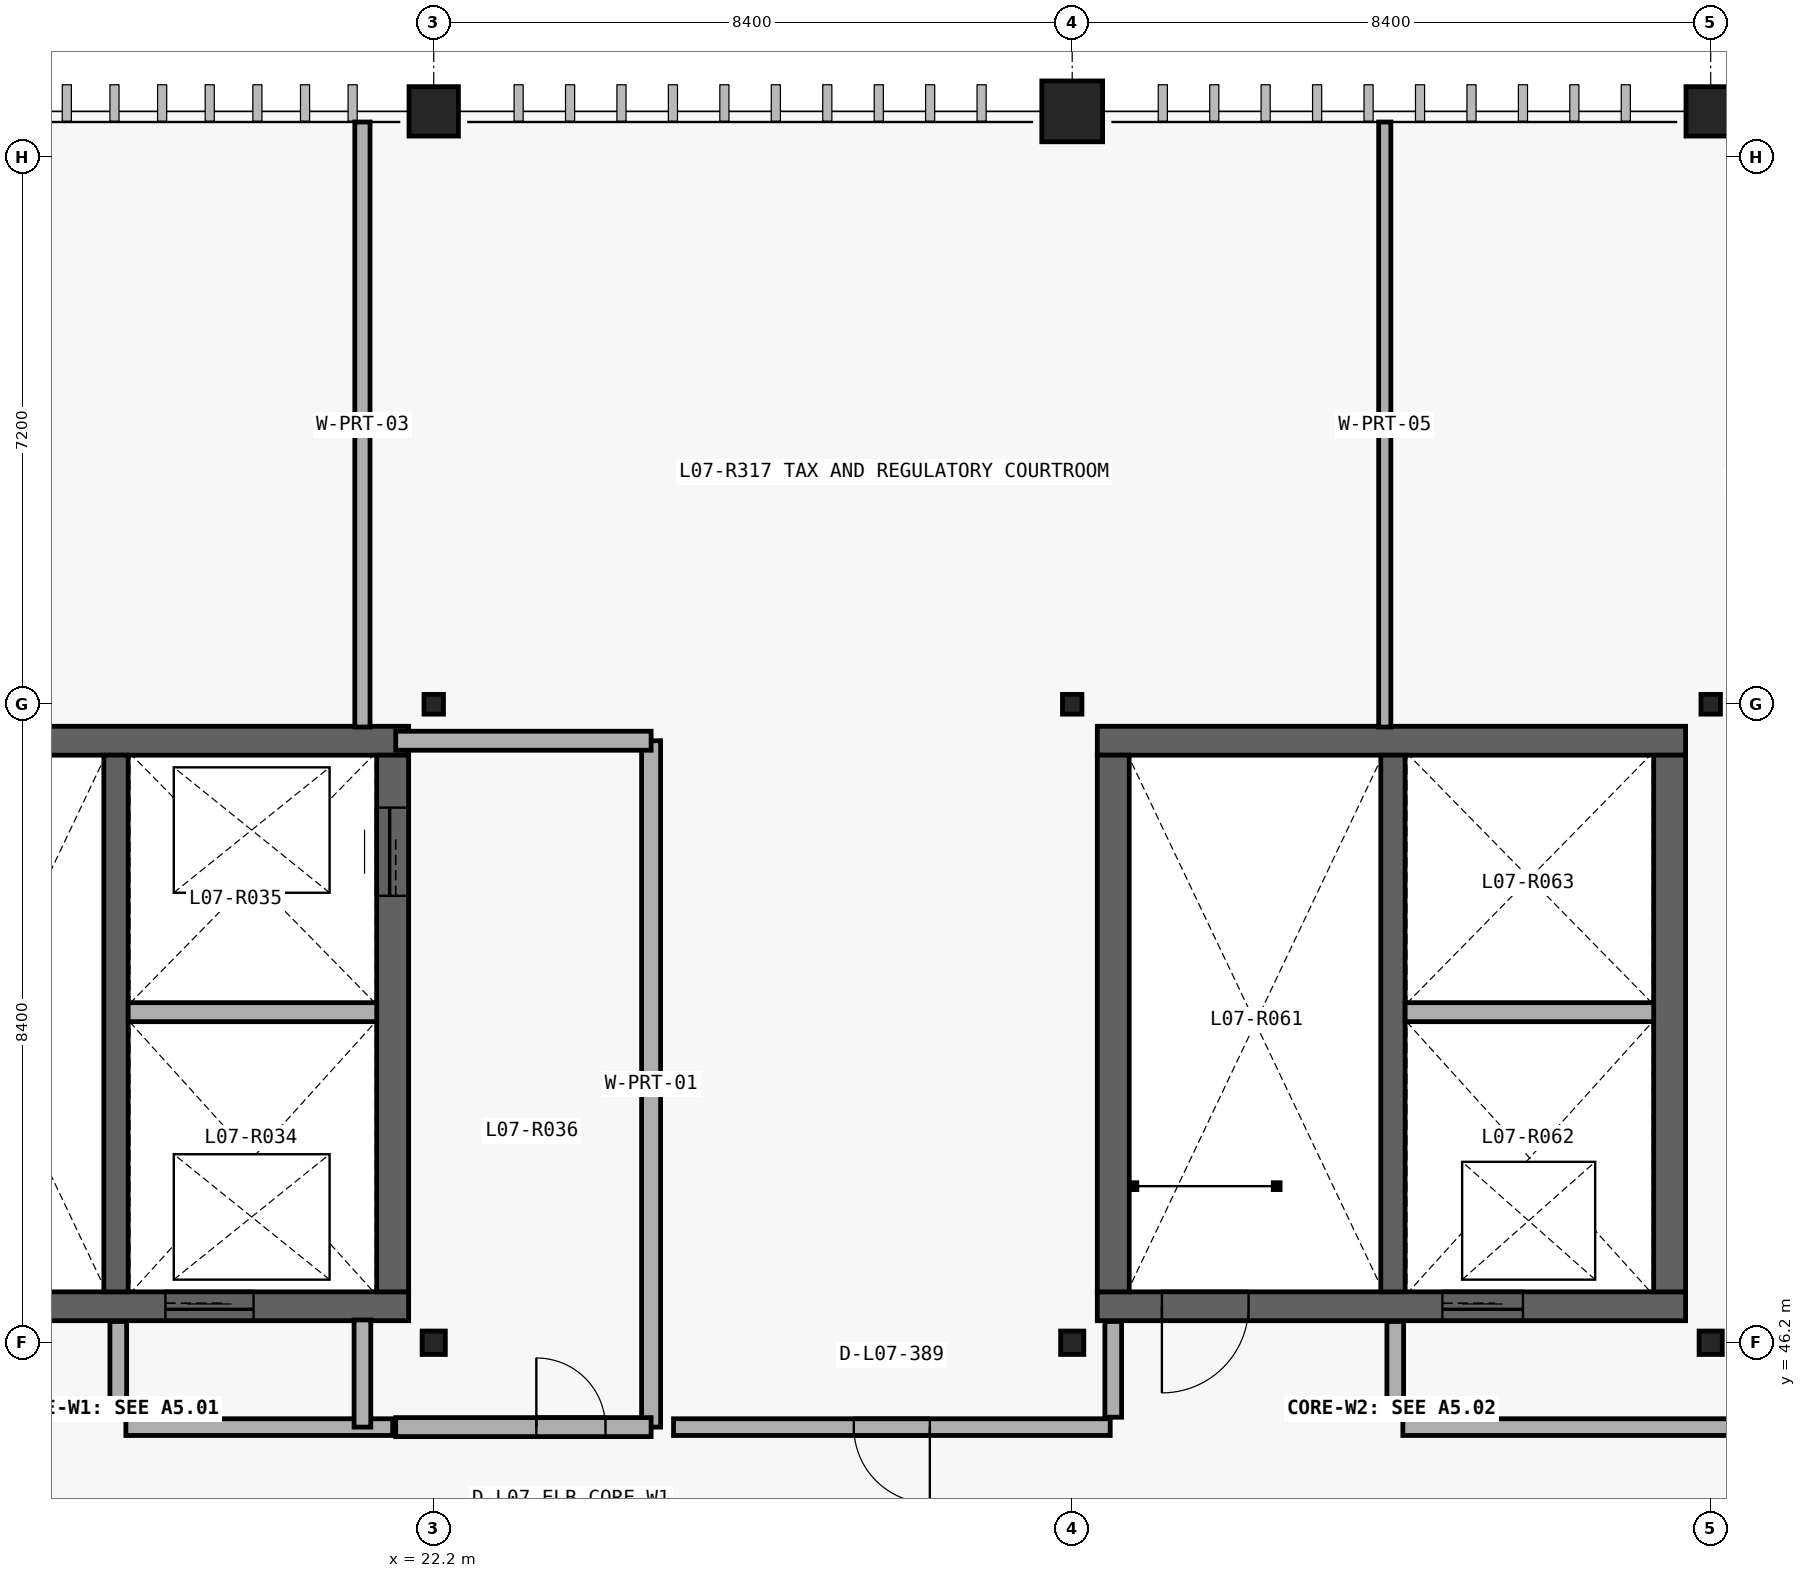
"""IFC4 building model, lengths in metres.
Left out: names, types, materials, properties, quantities, classifications, styles, units other than length and angle.
Written with IfcOpenShell. Run it as: python <this file> out.ifc"""

import sys

from ifc_helpers import new_model, si_unit, direction, frame, frame_2d, origin_with_axes, origin_2d_with_axis, place, context, subcontext, project, spatial, rectangle, circle, i_section, extrude, element, fill, save


model = new_model("IFC4")
c1 = context("Model", 3, precision=1e-05, world=origin_with_axes(), true_north=direction((0.0, 1.0)))
c2 = subcontext(c1, "Body", "Model", "MODEL_VIEW")
j1 = project(units=[si_unit("LENGTHUNIT", "METRE"), si_unit("PLANEANGLEUNIT", "RADIAN")], contexts=[c1])
p1 = place(None, origin_with_axes())
s1 = spatial("IfcSite", under=j1, at=p1, CompositionType="ELEMENT")
p2 = place(p1, origin_with_axes())
s2 = spatial("IfcBuilding", under=s1, at=p2, CompositionType="ELEMENT")
p3 = place(p2, frame((0.0, 0.0, 34.5), z_axis=(0.0, 0.0, 1.0), x_axis=(1.0, 0.0, 0.0)))
s3 = spatial("IfcBuildingStorey", under=s2, at=p3, CompositionType="ELEMENT", Elevation=34.5)
p4 = place(None, frame((14.13, 46.68, 34.5), z_axis=(0.0, 0.0, 1.0), x_axis=(1.0, 0.0, 0.0)))
e1 = element("IfcWall", 1, at=p4, inside=s3, PredefinedType="SHEAR", context=c2, shape_type="SweptSolid", body=[
    extrude(rectangle(XDim=7.74, YDim=0.38, at=frame_2d((3.87, 0.0), x_axis=(1.0, 0.0))), origin_with_axes(), (0.0, 0.0, 1.0), 4.5),
])
p5 = place(None, frame((15.55, 46.68, 34.5), z_axis=(0.0, 0.0, 1.0), x_axis=(1.0, 0.0, 0.0)))
e2 = element("IfcOpeningElement", 2, at=p5, cuts=e1, PredefinedType="OPENING", context=c2, shape_type="SweptSolid", body=[
    extrude(rectangle(XDim=1.14, YDim=2.18, at=frame_2d((0.0, 1.09), x_axis=(1.0, 0.0))), frame((0.0, 0.2, 0.0), z_axis=(0.0, -1.0, 0.0), x_axis=(1.0, 0.0, 0.0)), (0.0, 0.0, 1.0), 0.4),
])
p6 = place(None, frame((19.25, 46.68, 34.5), z_axis=(0.0, 0.0, 1.0), x_axis=(1.0, 0.0, 0.0)))
e3 = element("IfcOpeningElement", 3, at=p6, cuts=e1, PredefinedType="OPENING", context=c2, shape_type="SweptSolid", body=[
    extrude(rectangle(XDim=1.16, YDim=2.2, at=frame_2d((0.0, 1.1), x_axis=(1.0, 0.0))), frame((0.0, 0.2, 0.0), z_axis=(0.0, -1.0, 0.0), x_axis=(1.0, 0.0, 0.0)), (0.0, 0.0, 1.0), 0.4),
])
p7 = place(None, frame((21.87, 54.12, 34.5), z_axis=(0.0, 0.0, 1.0), x_axis=(-1.0, 0.0, 0.0)))
e4 = element("IfcWall", 4, at=p7, inside=s3, PredefinedType="SHEAR", context=c2, shape_type="SweptSolid", body=[
    extrude(rectangle(XDim=7.74, YDim=0.38, at=frame_2d((3.87, 0.0), x_axis=(1.0, 0.0))), origin_with_axes(), (0.0, 0.0, 1.0), 4.5),
])
p8 = place(None, frame((21.66, 46.87, 34.5), z_axis=(0.0, 0.0, 1.0), x_axis=(0.0, 1.0, 0.0)))
e5 = element("IfcWall", 5, at=p8, inside=s3, PredefinedType="SHEAR", context=c2, shape_type="SweptSolid", body=[
    extrude(rectangle(XDim=7.06, YDim=0.42, at=frame_2d((3.53, 0.0), x_axis=(1.0, 0.0))), origin_with_axes(), (0.0, 0.0, 1.0), 4.5),
])
p9 = place(None, frame((21.66, 52.66, 34.5), z_axis=(0.0, 0.0, 1.0), x_axis=(0.0, 1.0, 0.0)))
e6 = element("IfcOpeningElement", 6, at=p9, cuts=e5, PredefinedType="OPENING", context=c2, shape_type="SweptSolid", body=[
    extrude(rectangle(XDim=1.16, YDim=2.2, at=frame_2d((0.0, 1.1), x_axis=(1.0, 0.0))), frame((0.0, 0.22, 0.0), z_axis=(0.0, -1.0, 0.0), x_axis=(1.0, 0.0, 0.0)), (0.0, 0.0, 1.0), 0.44),
])
p10 = place(None, frame((18.02, 46.87, 34.5), z_axis=(0.0, 0.0, 1.0), x_axis=(0.0, 1.0, 0.0)))
e7 = element("IfcWall", 7, at=p10, inside=s3, PredefinedType="SHEAR", context=c2, shape_type="SweptSolid", body=[
    extrude(rectangle(XDim=7.06, YDim=0.32, at=frame_2d((3.53, 0.0), x_axis=(1.0, 0.0))), origin_with_axes(), (0.0, 0.0, 1.0), 4.5),
])
p11 = place(None, frame((18.18, 50.549, 34.5), z_axis=(0.0, 0.0, 1.0), x_axis=(1.0, 0.0, 0.0)))
e8 = element("IfcWall", 8, at=p11, inside=s3, PredefinedType="PARTITIONING", context=c2, shape_type="SweptSolid", body=[
    extrude(rectangle(XDim=3.27, YDim=0.25, at=frame_2d((1.635, 0.0), x_axis=(1.0, 0.0))), origin_with_axes(), (0.0, 0.0, 1.0), 4.14),
])
p12 = place(None, frame((25.06, 45.09, 34.5), z_axis=(0.0, 0.0, 1.0), x_axis=(0.0, 1.0, 0.0)))
e9 = element("IfcWall", 9, at=p12, inside=s3, PredefinedType="PARTITIONING", context=c2, shape_type="SweptSolid", body=[
    extrude(rectangle(XDim=9.03, YDim=0.25, at=frame_2d((4.515, 0.0), x_axis=(1.0, 0.0))), origin_with_axes(), (0.0, 0.0, 1.0), 4.14),
])
p13 = place(None, frame((21.7, 54.12, 34.5), z_axis=(0.0, 0.0, 1.0), x_axis=(1.0, 0.0, 0.0)))
e10 = element("IfcWall", 10, at=p13, inside=s3, PredefinedType="PARTITIONING", context=c2, shape_type="SweptSolid", body=[
    extrude(rectangle(XDim=3.36, YDim=0.25, at=frame_2d((1.68, 0.0), x_axis=(1.0, 0.0))), origin_with_axes(), (0.0, 0.0, 1.0), 4.14),
])
p14 = place(None, frame((21.7, 45.09, 34.5), z_axis=(0.0, 0.0, 1.0), x_axis=(1.0, 0.0, 0.0)))
e11 = element("IfcWall", 11, at=p14, inside=s3, PredefinedType="PARTITIONING", context=c2, shape_type="SweptSolid", body=[
    extrude(rectangle(XDim=3.36, YDim=0.25, at=frame_2d((1.68, 0.0), x_axis=(1.0, 0.0))), origin_with_axes(), (0.0, 0.0, 1.0), 4.14),
])
p15 = place(None, frame((24.005, 45.09, 34.5), z_axis=(0.0, 0.0, 1.0), x_axis=(1.0, 0.0, 0.0)))
e12 = element("IfcOpeningElement", 12, at=p15, cuts=e11, PredefinedType="OPENING", context=c2, shape_type="SweptSolid", body=[
    extrude(rectangle(XDim=0.91, YDim=2.12, at=frame_2d((0.0, 1.06), x_axis=(1.0, 0.0))), frame((0.0, 0.135, 0.0), z_axis=(0.0, -1.0, 0.0), x_axis=(1.0, 0.0, 0.0)), (0.0, 0.0, 1.0), 0.27),
])
p16 = place(None, frame((30.93, 46.68, 34.5), z_axis=(0.0, 0.0, 1.0), x_axis=(1.0, 0.0, 0.0)))
e13 = element("IfcWall", 13, at=p16, inside=s3, PredefinedType="SHEAR", context=c2, shape_type="SweptSolid", body=[
    extrude(rectangle(XDim=7.74, YDim=0.38, at=frame_2d((3.87, 0.0), x_axis=(1.0, 0.0))), origin_with_axes(), (0.0, 0.0, 1.0), 4.5),
])
p17 = place(None, frame((32.35, 46.68, 34.5), z_axis=(0.0, 0.0, 1.0), x_axis=(1.0, 0.0, 0.0)))
e14 = element("IfcOpeningElement", 14, at=p17, cuts=e13, PredefinedType="OPENING", context=c2, shape_type="SweptSolid", body=[
    extrude(rectangle(XDim=1.14, YDim=2.18, at=frame_2d((0.0, 1.09), x_axis=(1.0, 0.0))), frame((0.0, 0.2, 0.0), z_axis=(0.0, -1.0, 0.0), x_axis=(1.0, 0.0, 0.0)), (0.0, 0.0, 1.0), 0.4),
])
p18 = place(None, frame((36.0, 46.68, 34.5), z_axis=(0.0, 0.0, 1.0), x_axis=(1.0, 0.0, 0.0)))
e15 = element("IfcOpeningElement", 15, at=p18, cuts=e13, PredefinedType="OPENING", context=c2, shape_type="SweptSolid", body=[
    extrude(rectangle(XDim=1.06, YDim=2.16, at=frame_2d((0.0, 1.08), x_axis=(1.0, 0.0))), frame((0.0, 0.2, 0.0), z_axis=(0.0, -1.0, 0.0), x_axis=(1.0, 0.0, 0.0)), (0.0, 0.0, 1.0), 0.4),
])
p19 = place(None, frame((38.67, 54.12, 34.5), z_axis=(0.0, 0.0, 1.0), x_axis=(-1.0, 0.0, 0.0)))
e16 = element("IfcWall", 16, at=p19, inside=s3, PredefinedType="SHEAR", context=c2, shape_type="SweptSolid", body=[
    extrude(rectangle(XDim=7.74, YDim=0.38, at=frame_2d((3.87, 0.0), x_axis=(1.0, 0.0))), origin_with_axes(), (0.0, 0.0, 1.0), 4.5),
])
for number, where, z_axis, x_axis in (
    (17, (38.46, 46.87, 34.5), (0.0, 0.0, 1.0), (0.0, 1.0, 0.0)),
    (18, (31.14, 53.93, 34.5), (0.0, 0.0, 1.0), (0.0, -1.0, 0.0)),
):
    element("IfcWall", number, at=place(None, frame(where, z_axis=z_axis, x_axis=x_axis)), inside=s3, PredefinedType="SHEAR", context=c2, shape_type="SweptSolid", body=[
        extrude(rectangle(XDim=7.06, YDim=0.42, at=frame_2d((3.53, 0.0), x_axis=(1.0, 0.0))), origin_with_axes(), (0.0, 0.0, 1.0), 4.5),
    ])
p20 = place(None, frame((34.82, 46.87, 34.5), z_axis=(0.0, 0.0, 1.0), x_axis=(0.0, 1.0, 0.0)))
e19 = element("IfcWall", 19, at=p20, inside=s3, PredefinedType="SHEAR", context=c2, shape_type="SweptSolid", body=[
    extrude(rectangle(XDim=7.06, YDim=0.32, at=frame_2d((3.53, 0.0), x_axis=(1.0, 0.0))), origin_with_axes(), (0.0, 0.0, 1.0), 4.5),
])
p21 = place(None, frame((34.98, 50.549, 34.5), z_axis=(0.0, 0.0, 1.0), x_axis=(1.0, 0.0, 0.0)))
e20 = element("IfcWall", 20, at=p21, inside=s3, PredefinedType="PARTITIONING", context=c2, shape_type="SweptSolid", body=[
    extrude(rectangle(XDim=3.27, YDim=0.25, at=frame_2d((1.635, 0.0), x_axis=(1.0, 0.0))), origin_with_axes(), (0.0, 0.0, 1.0), 4.14),
])
for number, where, z_axis, x_axis in (
    (21, (18.05, 45.22, 34.5), (0.0, 0.0, 1.0), (0.0, 1.0, 0.0)),
    (22, (31.14, 45.22, 34.5), (0.0, 0.0, 1.0), (0.0, 1.0, 0.0)),
    (23, (34.85, 45.22, 34.5), (0.0, 0.0, 1.0), (0.0, 1.0, 0.0)),
):
    element("IfcWall", number, at=place(None, frame(where, z_axis=z_axis, x_axis=x_axis)), inside=s3, PredefinedType="PARTITIONING", context=c2, shape_type="SweptSolid", body=[
        extrude(rectangle(XDim=1.26, YDim=0.22, at=frame_2d((0.63, 0.0), x_axis=(1.0, 0.0))), origin_with_axes(), (0.0, 0.0, 1.0), 4.14),
    ])
p22 = place(None, frame((18.15, 45.09, 34.5), z_axis=(0.0, 0.0, 1.0), x_axis=(1.0, 0.0, 0.0)))
e24 = element("IfcWall", 24, at=p22, inside=s3, PredefinedType="PARTITIONING", context=c2, shape_type="SweptSolid", body=[
    extrude(rectangle(XDim=3.51, YDim=0.22, at=frame_2d((1.755, 0.0), x_axis=(1.0, 0.0))), origin_with_axes(), (0.0, 0.0, 1.0), 4.14),
])
p23 = place(None, frame((25.355, 45.09, 34.5), z_axis=(0.0, 0.0, 1.0), x_axis=(1.0, 0.0, 0.0)))
e25 = element("IfcWall", 25, at=p23, inside=s3, PredefinedType="PARTITIONING", context=c2, shape_type="SweptSolid", body=[
    extrude(rectangle(XDim=5.745, YDim=0.22, at=frame_2d((2.873, 0.0), x_axis=(1.0, 0.0))), origin_with_axes(), (0.0, 0.0, 1.0), 4.14),
])
p24 = place(None, frame((28.227, 45.09, 34.5), z_axis=(0.0, 0.0, 1.0), x_axis=(1.0, 0.0, 0.0)))
e26 = element("IfcOpeningElement", 26, at=p24, cuts=e25, PredefinedType="OPENING", context=c2, shape_type="SweptSolid", body=[
    extrude(rectangle(XDim=1.0, YDim=2.28, at=frame_2d((0.0, 1.14), x_axis=(1.0, 0.0))), frame((0.0, 0.12, 0.0), z_axis=(0.0, -1.0, 0.0), x_axis=(1.0, 0.0, 0.0)), (0.0, 0.0, 1.0), 0.24),
])
p25 = place(None, frame((34.95, 45.09, 34.5), z_axis=(0.0, 0.0, 1.0), x_axis=(1.0, 0.0, 0.0)))
e27 = element("IfcWall", 27, at=p25, inside=s3, PredefinedType="PARTITIONING", context=c2, shape_type="SweptSolid", body=[
    extrude(rectangle(XDim=11.71, YDim=0.22, at=frame_2d((5.855, 0.0), x_axis=(1.0, 0.0))), origin_with_axes(), (0.0, 0.0, 1.0), 4.14),
])
p26 = place(None, frame((40.805, 45.09, 34.5), z_axis=(0.0, 0.0, 1.0), x_axis=(1.0, 0.0, 0.0)))
e28 = element("IfcOpeningElement", 28, at=p26, cuts=e27, PredefinedType="OPENING", context=c2, shape_type="SweptSolid", body=[
    extrude(rectangle(XDim=1.6, YDim=2.32, at=frame_2d((0.0, 1.16), x_axis=(1.0, 0.0))), frame((0.0, 0.12, 0.0), z_axis=(0.0, -1.0, 0.0), x_axis=(1.0, 0.0, 0.0)), (0.0, 0.0, 1.0), 0.24),
])
p27 = place(None, frame((21.262, 45.09, 34.5), z_axis=(0.0, 0.0, 1.0), x_axis=(0.0, 1.0, 0.0)))
e29 = element("IfcWall", 29, at=p27, inside=s3, PredefinedType="PARTITIONING", context=c2, shape_type="SweptSolid", body=[
    extrude(rectangle(XDim=1.41, YDim=0.22, at=frame_2d((0.705, 0.0), x_axis=(1.0, 0.0))), origin_with_axes(), (0.0, 0.0, 1.0), 4.14),
])
p28 = place(None, frame((21.262, 54.3, 34.5), z_axis=(0.0, 0.0, 1.0), x_axis=(0.0, 1.0, 0.0)))
e30 = element("IfcWall", 30, at=p28, inside=s3, PredefinedType="PARTITIONING", context=c2, shape_type="SweptSolid", body=[
    extrude(rectangle(XDim=7.96, YDim=0.2, at=frame_2d((3.98, 0.0), x_axis=(1.0, 0.0))), origin_with_axes(), (0.0, 0.0, 1.0), 4.14),
])
p29 = place(None, frame((34.712, 54.3, 34.5), z_axis=(0.0, 0.0, 1.0), x_axis=(0.0, 1.0, 0.0)))
e31 = element("IfcWall", 31, at=p29, inside=s3, PredefinedType="PARTITIONING", context=c2, shape_type="SweptSolid", body=[
    extrude(rectangle(XDim=7.96, YDim=0.16, at=frame_2d((3.98, 0.0), x_axis=(1.0, 0.0))), origin_with_axes(), (0.0, 0.0, 1.0), 4.14),
])
p30 = place(None, frame((22.2, 46.2, 34.5), z_axis=(0.0, 0.0, 1.0), x_axis=(1.0, 0.0, 0.0)))
e32 = element("IfcColumn", 32, at=p30, inside=s3, PredefinedType="COLUMN", context=c2, shape_type="SweptSolid", body=[
    extrude(i_section(OverallWidth=0.305, OverallDepth=0.308, WebThickness=0.01, FlangeThickness=0.015, at=origin_2d_with_axis()), origin_with_axes(), (0.0, 0.0, 1.0), 4.5),
])
p31 = place(None, frame((22.2, 54.6, 34.5), z_axis=(0.0, 0.0, 1.0), x_axis=(1.0, 0.0, 0.0)))
e33 = element("IfcColumn", 33, at=p31, inside=s3, PredefinedType="COLUMN", context=c2, shape_type="SweptSolid", body=[
    extrude(i_section(OverallWidth=0.256, OverallDepth=0.26, WebThickness=0.011, FlangeThickness=0.017, at=origin_2d_with_axis()), origin_with_axes(), (0.0, 0.0, 1.0), 4.5),
])
p32 = place(None, frame((22.2, 62.4, 34.5), z_axis=(0.0, 0.0, 1.0), x_axis=(1.0, 0.0, 0.0)))
e34 = element("IfcColumn", 34, at=p32, inside=s3, PredefinedType="COLUMN", context=c2, shape_type="SweptSolid", body=[
    extrude(circle(Radius=0.325, at=origin_2d_with_axis()), origin_with_axes(), (0.0, 0.0, 1.0), 4.5),
])
p33 = place(None, frame((30.6, 46.2, 34.5), z_axis=(0.0, 0.0, 1.0), x_axis=(1.0, 0.0, 0.0)))
e35 = element("IfcColumn", 35, at=p33, inside=s3, PredefinedType="COLUMN", context=c2, shape_type="SweptSolid", body=[
    extrude(i_section(OverallWidth=0.305, OverallDepth=0.308, WebThickness=0.01, FlangeThickness=0.015, at=origin_2d_with_axis()), origin_with_axes(), (0.0, 0.0, 1.0), 4.5),
])
p34 = place(None, frame((30.6, 54.6, 34.5), z_axis=(0.0, 0.0, 1.0), x_axis=(1.0, 0.0, 0.0)))
e36 = element("IfcColumn", 36, at=p34, inside=s3, PredefinedType="COLUMN", context=c2, shape_type="SweptSolid", body=[
    extrude(i_section(OverallWidth=0.256, OverallDepth=0.26, WebThickness=0.011, FlangeThickness=0.017, at=origin_2d_with_axis()), origin_with_axes(), (0.0, 0.0, 1.0), 4.5),
])
p35 = place(None, frame((30.6, 62.4, 34.5), z_axis=(0.0, 0.0, 1.0), x_axis=(1.0, 0.0, 0.0)))
e37 = element("IfcColumn", 37, at=p35, inside=s3, PredefinedType="COLUMN", context=c2, shape_type="SweptSolid", body=[
    extrude(circle(Radius=0.4, at=origin_2d_with_axis()), origin_with_axes(), (0.0, 0.0, 1.0), 4.5),
])
p36 = place(None, frame((39.0, 46.2, 34.5), z_axis=(0.0, 0.0, 1.0), x_axis=(1.0, 0.0, 0.0)))
e38 = element("IfcColumn", 38, at=p36, inside=s3, PredefinedType="COLUMN", context=c2, shape_type="SweptSolid", body=[
    extrude(i_section(OverallWidth=0.305, OverallDepth=0.308, WebThickness=0.01, FlangeThickness=0.015, at=origin_2d_with_axis()), origin_with_axes(), (0.0, 0.0, 1.0), 4.5),
])
p37 = place(None, frame((39.0, 54.6, 34.5), z_axis=(0.0, 0.0, 1.0), x_axis=(1.0, 0.0, 0.0)))
e39 = element("IfcColumn", 39, at=p37, inside=s3, PredefinedType="COLUMN", context=c2, shape_type="SweptSolid", body=[
    extrude(i_section(OverallWidth=0.256, OverallDepth=0.26, WebThickness=0.011, FlangeThickness=0.017, at=origin_2d_with_axis()), origin_with_axes(), (0.0, 0.0, 1.0), 4.5),
])
p38 = place(None, frame((39.0, 62.4, 34.5), z_axis=(0.0, 0.0, 1.0), x_axis=(1.0, 0.0, 0.0)))
e40 = element("IfcColumn", 40, at=p38, inside=s3, PredefinedType="COLUMN", context=c2, shape_type="SweptSolid", body=[
    extrude(circle(Radius=0.325, at=origin_2d_with_axis()), origin_with_axes(), (0.0, 0.0, 1.0), 4.5),
])
p39 = place(None, frame((19.25, 46.68, 34.5), z_axis=(0.0, 0.0, 1.0), x_axis=(-1.0, 0.0, 0.0)))
e41 = element("IfcDoor", 41, at=p39, inside=s3, OperationType="SLIDING_TO_LEFT", PredefinedType="DOOR", context=c2, shape_type="SweptSolid", body=[
    extrude(rectangle(XDim=1.16, YDim=2.2, at=frame_2d((0.0, 1.1), x_axis=(1.0, 0.0))), frame((0.0, 0.04, 0.0), z_axis=(0.0, -1.0, 0.0), x_axis=(1.0, 0.0, 0.0)), (0.0, 0.0, 1.0), 0.08),
])
fill(e3, e41)
p40 = place(None, frame((21.66, 52.66, 34.5), z_axis=(0.0, 0.0, 1.0), x_axis=(0.0, 1.0, 0.0)))
e42 = element("IfcDoor", 42, at=p40, inside=s3, OperationType="SLIDING_TO_LEFT", PredefinedType="DOOR", context=c2, shape_type="SweptSolid", body=[
    extrude(rectangle(XDim=1.16, YDim=2.2, at=frame_2d((0.0, 1.1), x_axis=(1.0, 0.0))), frame((0.0, 0.04, 0.0), z_axis=(0.0, -1.0, 0.0), x_axis=(1.0, 0.0, 0.0)), (0.0, 0.0, 1.0), 0.08),
])
fill(e6, e42)
p41 = place(None, frame((24.005, 45.09, 34.5), z_axis=(0.0, 0.0, 1.0), x_axis=(1.0, 0.0, 0.0)))
e43 = element("IfcDoor", 43, at=p41, inside=s3, OperationType="SINGLE_SWING_LEFT", PredefinedType="DOOR", context=c2, shape_type="SweptSolid", body=[
    extrude(rectangle(XDim=0.91, YDim=2.12, at=frame_2d((0.0, 1.06), x_axis=(1.0, 0.0))), frame((0.0, 0.04, 0.0), z_axis=(0.0, -1.0, 0.0), x_axis=(1.0, 0.0, 0.0)), (0.0, 0.0, 1.0), 0.08),
])
fill(e12, e43)
p42 = place(None, frame((32.35, 46.68, 34.5), z_axis=(0.0, 0.0, 1.0), x_axis=(-1.0, 0.0, 0.0)))
e44 = element("IfcDoor", 44, at=p42, inside=s3, OperationType="SINGLE_SWING_LEFT", PredefinedType="DOOR", context=c2, shape_type="SweptSolid", body=[
    extrude(rectangle(XDim=1.14, YDim=2.18, at=frame_2d((0.0, 1.09), x_axis=(1.0, 0.0))), frame((0.0, 0.04, 0.0), z_axis=(0.0, -1.0, 0.0), x_axis=(1.0, 0.0, 0.0)), (0.0, 0.0, 1.0), 0.08),
])
fill(e14, e44)
p43 = place(None, frame((36.0, 46.68, 34.5), z_axis=(0.0, 0.0, 1.0), x_axis=(-1.0, 0.0, 0.0)))
e45 = element("IfcDoor", 45, at=p43, inside=s3, OperationType="SLIDING_TO_LEFT", PredefinedType="DOOR", context=c2, shape_type="SweptSolid", body=[
    extrude(rectangle(XDim=1.06, YDim=2.16, at=frame_2d((0.0, 1.08), x_axis=(1.0, 0.0))), frame((0.0, 0.04, 0.0), z_axis=(0.0, -1.0, 0.0), x_axis=(1.0, 0.0, 0.0)), (0.0, 0.0, 1.0), 0.08),
])
fill(e15, e45)
p44 = place(None, frame((28.227, 45.09, 34.5), z_axis=(0.0, 0.0, 1.0), x_axis=(-1.0, 0.0, 0.0)))
e46 = element("IfcDoor", 46, at=p44, inside=s3, OperationType="SINGLE_SWING_RIGHT", PredefinedType="DOOR", context=c2, shape_type="SweptSolid", body=[
    extrude(rectangle(XDim=1.0, YDim=2.28, at=frame_2d((0.0, 1.14), x_axis=(1.0, 0.0))), frame((0.0, 0.04, 0.0), z_axis=(0.0, -1.0, 0.0), x_axis=(1.0, 0.0, 0.0)), (0.0, 0.0, 1.0), 0.08),
])
fill(e26, e46)
save(model, sys.argv[1])
